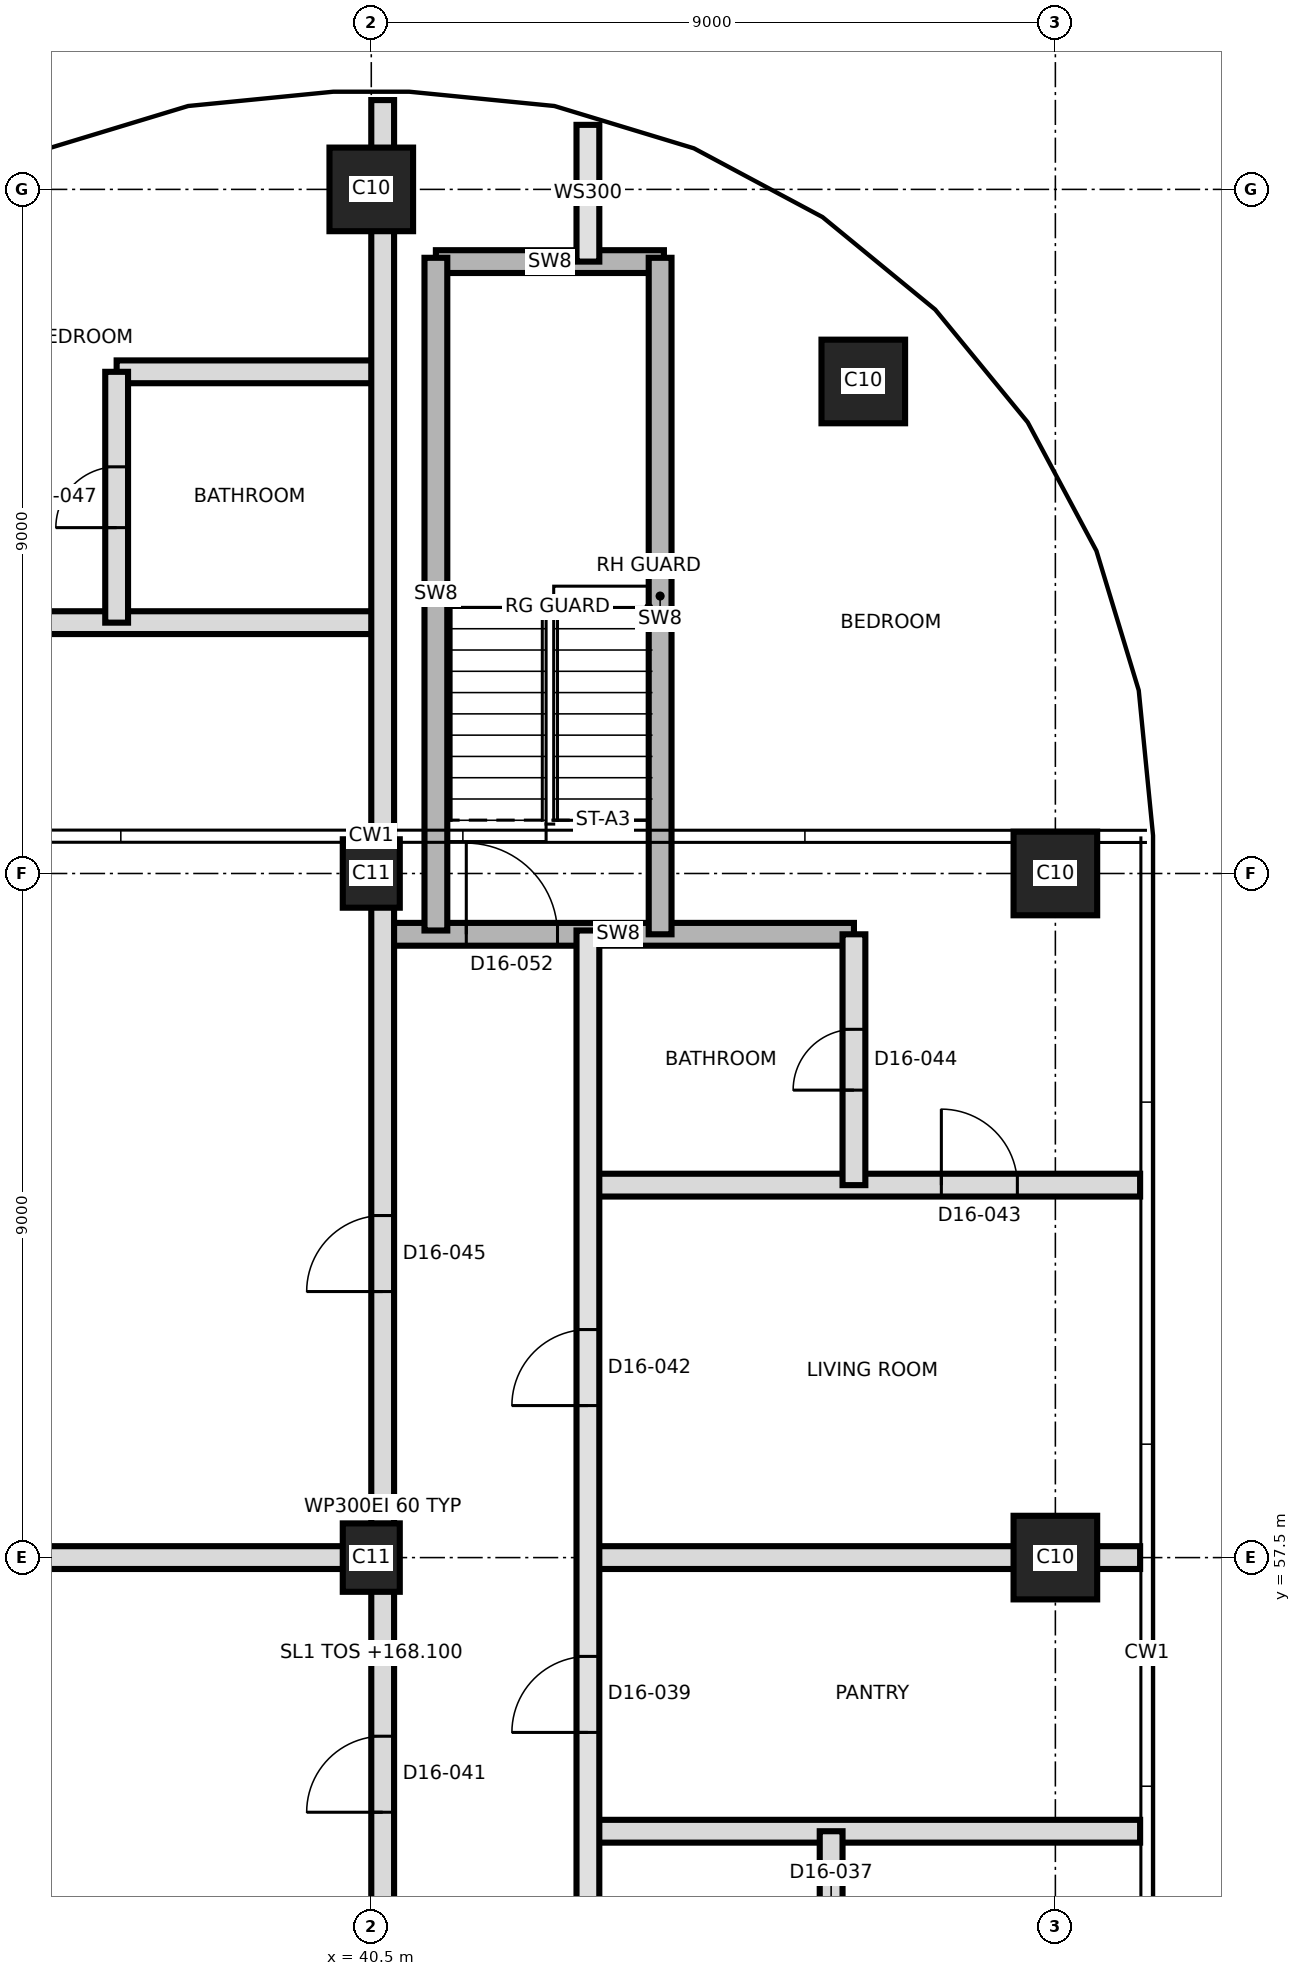
"""IFC4 building model, lengths in metres.
Left out: names, types, materials, properties, quantities, classifications, styles, units other than length and angle.
Written with IfcOpenShell. Run it as: python <this file> out.ifc"""

import sys

from ifc_helpers import new_model, si_unit, direction, frame, frame_2d, origin, origin_2d, place, context, subcontext, project, spatial, rectangle, extrude, element, fill, save


model = new_model("IFC4")
c1 = context("Model", 3, precision=1e-05, world=origin(), true_north=direction((0.0, 1.0)))
c2 = subcontext(c1, "Body", "Model", "MODEL_VIEW")
j1 = project(units=[si_unit("LENGTHUNIT", "METRE"), si_unit("PLANEANGLEUNIT", "RADIAN")], contexts=[c1])
p1 = place(None, origin())
s1 = spatial("IfcSite", under=j1, at=p1, CompositionType="ELEMENT")
p2 = place(p1, origin())
s2 = spatial("IfcBuilding", under=s1, at=p2, CompositionType="ELEMENT")
p3 = place(p2, frame((0.0, 0.0, 168.1)))
s3 = spatial("IfcBuildingStorey", under=s2, at=p3, CompositionType="ELEMENT", Elevation=168.1)
p4 = place(p3, frame((40.5, 57.5, 0.0), z_axis=(0.0, 0.0, 1.0), x_axis=(0.0, 1.0, 0.0)))
e1 = element("IfcColumn", 1, at=p4, inside=s3, PredefinedType="COLUMN", context=c2, shape_type="SweptSolid", body=[
    extrude(rectangle(XDim=0.9, YDim=0.75, at=origin_2d()), origin(), (0.0, 0.0, 1.0), 3.7),
])
p5 = place(p3, frame((49.5, 57.5, 0.0), z_axis=(0.0, 0.0, 1.0), x_axis=(1.0, 0.0, 0.0)))
e2 = element("IfcColumn", 2, at=p5, inside=s3, PredefinedType="COLUMN", context=c2, shape_type="SweptSolid", body=[
    extrude(rectangle(XDim=1.1, YDim=1.1, at=origin_2d()), origin(), (0.0, 0.0, 1.0), 3.7),
])
p6 = place(p3, frame((40.5, 66.5, 0.0), z_axis=(0.0, 0.0, 1.0), x_axis=(0.0, 1.0, 0.0)))
e3 = element("IfcColumn", 3, at=p6, inside=s3, PredefinedType="COLUMN", context=c2, shape_type="SweptSolid", body=[
    extrude(rectangle(XDim=0.9, YDim=0.75, at=origin_2d()), origin(), (0.0, 0.0, 1.0), 3.7),
])
for number, where, z_axis, x_axis in (
    (4, (49.5, 66.5, 0.0), (0.0, 0.0, 1.0), (1.0, 0.0, 0.0)),
    (5, (46.973, 72.973, 0.0), (0.0, 0.0, 1.0), (1.0, 0.0, 0.0)),
    (6, (40.5, 75.5, 0.0), (0.0, 0.0, 1.0), (1.0, 0.0, 0.0)),
):
    element("IfcColumn", number, at=place(p3, frame(where, z_axis=z_axis, x_axis=x_axis)), inside=s3, PredefinedType="COLUMN", context=c2, shape_type="SweptSolid", body=[
        extrude(rectangle(XDim=1.1, YDim=1.1, at=origin_2d()), origin(), (0.0, 0.0, 1.0), 3.7),
    ])
p7 = place(p3, frame((43.35, 53.9, 0.0), z_axis=(0.0, 0.0, 1.0), x_axis=(1.0, 0.0, 0.0)))
e7 = element("IfcWall", 7, at=p7, inside=s3, PredefinedType="PARTITIONING", context=c2, shape_type="SweptSolid", body=[
    extrude(rectangle(XDim=7.265, YDim=0.3, at=frame_2d((3.632, 0.0))), origin(), (0.0, 0.0, 1.0), 3.4),
])
p8 = place(p3, frame((30.565, 57.5, 0.0), z_axis=(0.0, 0.0, 1.0), x_axis=(1.0, 0.0, 0.0)))
e8 = element("IfcWall", 8, at=p8, inside=s3, PredefinedType="PARTITIONING", context=c2, shape_type="SweptSolid", body=[
    extrude(rectangle(XDim=10.085, YDim=0.3, at=frame_2d((5.042, 0.0))), origin(), (0.0, 0.0, 1.0), 3.4),
])
p9 = place(p3, frame((43.35, 57.5, 0.0), z_axis=(0.0, 0.0, 1.0), x_axis=(1.0, 0.0, 0.0)))
e9 = element("IfcWall", 9, at=p9, inside=s3, PredefinedType="PARTITIONING", context=c2, shape_type="SweptSolid", body=[
    extrude(rectangle(XDim=7.265, YDim=0.3, at=frame_2d((3.632, 0.0))), origin(), (0.0, 0.0, 1.0), 3.4),
])
p10 = place(p3, frame((43.35, 62.4, 0.0), z_axis=(0.0, 0.0, 1.0), x_axis=(1.0, 0.0, 0.0)))
e10 = element("IfcWall", 10, at=p10, inside=s3, PredefinedType="PARTITIONING", context=c2, shape_type="SweptSolid", body=[
    extrude(rectangle(XDim=7.265, YDim=0.3, at=frame_2d((3.632, 0.0))), origin(), (0.0, 0.0, 1.0), 3.4),
])
p11 = place(p10, frame((4.65, 0.0, 0.0)))
e11 = element("IfcOpeningElement", 11, at=p11, cuts=e10, PredefinedType="OPENING", context=c2, shape_type="SweptSolid", body=[
    extrude(rectangle(XDim=1.0, YDim=2.1, at=frame_2d((0.5, 1.05))), frame((0.0, 0.16, 0.0), z_axis=(0.0, -1.0, 0.0), x_axis=(1.0, 0.0, 0.0)), (0.0, 0.0, 1.0), 0.32),
])
p12 = place(p3, frame((40.65, 65.7, 0.0), z_axis=(0.0, 0.0, 1.0), x_axis=(1.0, 0.0, 0.0)))
e12 = element("IfcWall", 12, at=p12, inside=s3, PredefinedType="SHEAR", context=c2, shape_type="SweptSolid", body=[
    extrude(rectangle(XDim=6.2, YDim=0.3, at=frame_2d((3.1, 0.0))), origin(), (0.0, 0.0, 1.0), 3.4),
])
p13 = place(p12, frame((1.1, 0.0, 0.0)))
e13 = element("IfcOpeningElement", 13, at=p13, cuts=e12, PredefinedType="OPENING", context=c2, shape_type="SweptSolid", body=[
    extrude(rectangle(XDim=1.2, YDim=2.1, at=frame_2d((0.6, 1.05))), frame((0.0, 0.16, 0.0), z_axis=(0.0, -1.0, 0.0), x_axis=(1.0, 0.0, 0.0)), (0.0, 0.0, 1.0), 0.32),
])
p14 = place(p3, frame((30.788, 69.8, 0.0), z_axis=(0.0, 0.0, 1.0), x_axis=(1.0, 0.0, 0.0)))
e14 = element("IfcWall", 14, at=p14, inside=s3, PredefinedType="PARTITIONING", context=c2, shape_type="SweptSolid", body=[
    extrude(rectangle(XDim=9.862, YDim=0.3, at=frame_2d((4.931, 0.0))), origin(), (0.0, 0.0, 1.0), 3.4),
])
p15 = place(p14, frame((4.212, 0.0, 0.0)))
e15 = element("IfcOpeningElement", 15, at=p15, cuts=e14, PredefinedType="OPENING", context=c2, shape_type="SweptSolid", body=[
    extrude(rectangle(XDim=1.0, YDim=2.1, at=frame_2d((0.5, 1.05))), frame((0.0, 0.16, 0.0), z_axis=(0.0, -1.0, 0.0), x_axis=(1.0, 0.0, 0.0)), (0.0, 0.0, 1.0), 0.32),
])
p16 = place(p3, frame((37.15, 73.1, 0.0), z_axis=(0.0, 0.0, 1.0), x_axis=(1.0, 0.0, 0.0)))
e16 = element("IfcWall", 16, at=p16, inside=s3, PredefinedType="PARTITIONING", context=c2, shape_type="SweptSolid", body=[
    extrude(rectangle(XDim=3.5, YDim=0.3, at=frame_2d((1.75, 0.0))), origin(), (0.0, 0.0, 1.0), 3.4),
])
p17 = place(p3, frame((41.35, 74.55, 0.0), z_axis=(0.0, 0.0, 1.0), x_axis=(1.0, 0.0, 0.0)))
e17 = element("IfcWall", 17, at=p17, inside=s3, PredefinedType="SHEAR", context=c2, shape_type="SweptSolid", body=[
    extrude(rectangle(XDim=3.0, YDim=0.3, at=frame_2d((1.5, 0.0))), origin(), (0.0, 0.0, 1.0), 3.4),
])
p18 = place(p3, frame((37.15, 69.8, 0.0), z_axis=(0.0, 0.0, 1.0), x_axis=(0.0, 1.0, 0.0)))
e18 = element("IfcWall", 18, at=p18, inside=s3, PredefinedType="PARTITIONING", context=c2, shape_type="SweptSolid", body=[
    extrude(rectangle(XDim=3.3, YDim=0.3, at=frame_2d((1.65, 0.0))), origin(), (0.0, 0.0, 1.0), 3.4),
])
p19 = place(p18, frame((1.25, 0.0, 0.0)))
e19 = element("IfcOpeningElement", 19, at=p19, cuts=e18, PredefinedType="OPENING", context=c2, shape_type="SweptSolid", body=[
    extrude(rectangle(XDim=0.8, YDim=2.1, at=frame_2d((0.4, 1.05))), frame((0.0, 0.16, 0.0), z_axis=(0.0, -1.0, 0.0), x_axis=(1.0, 0.0, 0.0)), (0.0, 0.0, 1.0), 0.32),
])
p20 = place(p3, frame((40.65, 39.65, 0.0), z_axis=(0.0, 0.0, 1.0), x_axis=(0.0, 1.0, 0.0)))
e20 = element("IfcWall", 20, at=p20, inside=s3, PredefinedType="PARTITIONING", context=c2, shape_type="SweptSolid", body=[
    extrude(rectangle(XDim=37.025, YDim=0.3, at=frame_2d((18.513, 0.0))), origin(), (0.0, 0.0, 1.0), 3.4),
])
p21 = place(p20, frame((1.0, 0.0, 0.0)))
e21 = element("IfcOpeningElement", 21, at=p21, cuts=e20, PredefinedType="OPENING", context=c2, shape_type="SweptSolid", body=[
    extrude(rectangle(XDim=1.0, YDim=2.1, at=frame_2d((0.5, 1.05))), frame((0.0, 0.16, 0.0), z_axis=(0.0, -1.0, 0.0), x_axis=(1.0, 0.0, 0.0)), (0.0, 0.0, 1.0), 0.32),
])
p22 = place(p20, frame((6.85, 0.0, 0.0)))
e22 = element("IfcOpeningElement", 22, at=p22, cuts=e20, PredefinedType="OPENING", context=c2, shape_type="SweptSolid", body=[
    extrude(rectangle(XDim=1.0, YDim=2.1, at=frame_2d((0.5, 1.05))), frame((0.0, 0.16, 0.0), z_axis=(0.0, -1.0, 0.0), x_axis=(1.0, 0.0, 0.0)), (0.0, 0.0, 1.0), 0.32),
])
p23 = place(p20, frame((14.5, 0.0, 0.0)))
e23 = element("IfcOpeningElement", 23, at=p23, cuts=e20, PredefinedType="OPENING", context=c2, shape_type="SweptSolid", body=[
    extrude(rectangle(XDim=1.0, YDim=2.4, at=frame_2d((0.5, 1.2))), frame((0.0, 0.16, 0.0), z_axis=(0.0, -1.0, 0.0), x_axis=(1.0, 0.0, 0.0)), (0.0, 0.0, 1.0), 0.32),
])
p24 = place(p20, frame((21.35, 0.0, 0.0)))
e24 = element("IfcOpeningElement", 24, at=p24, cuts=e20, PredefinedType="OPENING", context=c2, shape_type="SweptSolid", body=[
    extrude(rectangle(XDim=1.0, YDim=2.4, at=frame_2d((0.5, 1.2))), frame((0.0, 0.16, 0.0), z_axis=(0.0, -1.0, 0.0), x_axis=(1.0, 0.0, 0.0)), (0.0, 0.0, 1.0), 0.32),
])
p25 = place(p3, frame((41.35, 65.75, 0.0), z_axis=(0.0, 0.0, 1.0), x_axis=(0.0, 1.0, 0.0)))
e25 = element("IfcWall", 25, at=p25, inside=s3, PredefinedType="SHEAR", context=c2, shape_type="SweptSolid", body=[
    extrude(rectangle(XDim=8.85, YDim=0.3, at=frame_2d((4.425, 0.0))), origin(), (0.0, 0.0, 1.0), 3.4),
])
p26 = place(p3, frame((43.35, 39.65, 0.0), z_axis=(0.0, 0.0, 1.0), x_axis=(0.0, 1.0, 0.0)))
e26 = element("IfcWall", 26, at=p26, inside=s3, PredefinedType="SOLIDWALL", context=c2, shape_type="SweptSolid", body=[
    extrude(rectangle(XDim=26.1, YDim=0.3, at=frame_2d((13.05, 0.0))), origin(), (0.0, 0.0, 1.0), 3.4),
])
p27 = place(p26, frame((0.985, 0.0, 0.0)))
e27 = element("IfcOpeningElement", 27, at=p27, cuts=e26, PredefinedType="OPENING", context=c2, shape_type="SweptSolid", body=[
    extrude(rectangle(XDim=1.2, YDim=2.1, at=frame_2d((0.6, 1.05))), frame((0.0, 0.16, 0.0), z_axis=(0.0, -1.0, 0.0), x_axis=(1.0, 0.0, 0.0)), (0.0, 0.0, 1.0), 0.32),
])
p28 = place(p26, frame((4.235, 0.0, 0.0)))
e28 = element("IfcOpeningElement", 28, at=p28, cuts=e26, PredefinedType="OPENING", context=c2, shape_type="SweptSolid", body=[
    extrude(rectangle(XDim=1.0, YDim=2.1, at=frame_2d((0.5, 1.05))), frame((0.0, 0.16, 0.0), z_axis=(0.0, -1.0, 0.0), x_axis=(1.0, 0.0, 0.0)), (0.0, 0.0, 1.0), 0.32),
])
p29 = place(p26, frame((9.7, 0.0, 0.0)))
e29 = element("IfcOpeningElement", 29, at=p29, cuts=e26, PredefinedType="OPENING", context=c2, shape_type="SweptSolid", body=[
    extrude(rectangle(XDim=1.0, YDim=2.1, at=frame_2d((0.5, 1.05))), frame((0.0, 0.16, 0.0), z_axis=(0.0, -1.0, 0.0), x_axis=(1.0, 0.0, 0.0)), (0.0, 0.0, 1.0), 0.32),
])
p30 = place(p26, frame((15.55, 0.0, 0.0)))
e30 = element("IfcOpeningElement", 30, at=p30, cuts=e26, PredefinedType="OPENING", context=c2, shape_type="SweptSolid", body=[
    extrude(rectangle(XDim=1.0, YDim=2.1, at=frame_2d((0.5, 1.05))), frame((0.0, 0.16, 0.0), z_axis=(0.0, -1.0, 0.0), x_axis=(1.0, 0.0, 0.0)), (0.0, 0.0, 1.0), 0.32),
])
p31 = place(p26, frame((19.85, 0.0, 0.0)))
e31 = element("IfcOpeningElement", 31, at=p31, cuts=e26, PredefinedType="OPENING", context=c2, shape_type="SweptSolid", body=[
    extrude(rectangle(XDim=1.0, YDim=2.4, at=frame_2d((0.5, 1.2))), frame((0.0, 0.16, 0.0), z_axis=(0.0, -1.0, 0.0), x_axis=(1.0, 0.0, 0.0)), (0.0, 0.0, 1.0), 0.32),
])
p32 = place(p3, frame((43.35, 74.55, 0.0), z_axis=(0.0, 0.0, 1.0), x_axis=(0.0, 1.0, 0.0)))
e32 = element("IfcWall", 32, at=p32, inside=s3, PredefinedType="SOLIDWALL", context=c2, shape_type="SweptSolid", body=[
    extrude(rectangle(XDim=1.799, YDim=0.3, at=frame_2d((0.899, 0.0))), origin(), (0.0, 0.0, 1.0), 3.4),
])
p33 = place(p3, frame((44.3, 65.7, 0.0), z_axis=(0.0, 0.0, 1.0), x_axis=(0.0, 1.0, 0.0)))
e33 = element("IfcWall", 33, at=p33, inside=s3, PredefinedType="SHEAR", context=c2, shape_type="SweptSolid", body=[
    extrude(rectangle(XDim=8.9, YDim=0.3, at=frame_2d((4.45, 0.0))), origin(), (0.0, 0.0, 1.0), 3.4),
])
p34 = place(p3, frame((46.55, 51.2, 0.0), z_axis=(0.0, 0.0, 1.0), x_axis=(0.0, 1.0, 0.0)))
e34 = element("IfcWall", 34, at=p34, inside=s3, PredefinedType="PARTITIONING", context=c2, shape_type="SweptSolid", body=[
    extrude(rectangle(XDim=2.7, YDim=0.3, at=frame_2d((1.35, 0.0))), origin(), (0.0, 0.0, 1.0), 3.4),
])
p35 = place(p34, frame((0.95, 0.0, 0.0)))
e35 = element("IfcOpeningElement", 35, at=p35, cuts=e34, PredefinedType="OPENING", context=c2, shape_type="SweptSolid", body=[
    extrude(rectangle(XDim=0.8, YDim=2.1, at=frame_2d((0.4, 1.05))), frame((0.0, 0.16, 0.0), z_axis=(0.0, -1.0, 0.0), x_axis=(1.0, 0.0, 0.0)), (0.0, 0.0, 1.0), 0.32),
])
p36 = place(p3, frame((46.85, 62.4, 0.0), z_axis=(0.0, 0.0, 1.0), x_axis=(0.0, 1.0, 0.0)))
e36 = element("IfcWall", 36, at=p36, inside=s3, PredefinedType="PARTITIONING", context=c2, shape_type="SweptSolid", body=[
    extrude(rectangle(XDim=3.3, YDim=0.3, at=frame_2d((1.65, 0.0))), origin(), (0.0, 0.0, 1.0), 3.4),
])
p37 = place(p36, frame((1.25, 0.0, 0.0)))
e37 = element("IfcOpeningElement", 37, at=p37, cuts=e36, PredefinedType="OPENING", context=c2, shape_type="SweptSolid", body=[
    extrude(rectangle(XDim=0.8, YDim=2.1, at=frame_2d((0.4, 1.05))), frame((0.0, 0.16, 0.0), z_axis=(0.0, -1.0, 0.0), x_axis=(1.0, 0.0, 0.0)), (0.0, 0.0, 1.0), 0.32),
])
p38 = place(p30, origin())
e38 = element("IfcDoor", 38, at=p38, inside=s3, OperationType="SINGLE_SWING_LEFT", PredefinedType="DOOR", context=c2, shape_type="SweptSolid", body=[
    extrude(rectangle(XDim=1.0, YDim=2.1, at=frame_2d((0.5, 1.05))), frame((0.0, 0.025, 0.0), z_axis=(0.0, -1.0, 0.0), x_axis=(1.0, 0.0, 0.0)), (0.0, 0.0, 1.0), 0.05),
])
fill(e30, e38)
p39 = place(p23, origin())
e39 = element("IfcDoor", 39, at=p39, inside=s3, OperationType="SINGLE_SWING_RIGHT", PredefinedType="DOOR", context=c2, shape_type="SweptSolid", body=[
    extrude(rectangle(XDim=1.0, YDim=2.4, at=frame_2d((0.5, 1.2))), frame((0.0, 0.025, 0.0), z_axis=(0.0, -1.0, 0.0), x_axis=(1.0, 0.0, 0.0)), (0.0, 0.0, 1.0), 0.05),
])
fill(e23, e39)
p40 = place(p31, origin())
e40 = element("IfcDoor", 40, at=p40, inside=s3, OperationType="SINGLE_SWING_LEFT", PredefinedType="DOOR", context=c2, shape_type="SweptSolid", body=[
    extrude(rectangle(XDim=1.0, YDim=2.4, at=frame_2d((0.5, 1.2))), frame((0.0, 0.025, 0.0), z_axis=(0.0, -1.0, 0.0), x_axis=(1.0, 0.0, 0.0)), (0.0, 0.0, 1.0), 0.05),
])
fill(e31, e40)
p41 = place(p11, origin())
e41 = element("IfcDoor", 41, at=p41, inside=s3, OperationType="SINGLE_SWING_RIGHT", PredefinedType="DOOR", context=c2, shape_type="SweptSolid", body=[
    extrude(rectangle(XDim=1.0, YDim=2.1, at=frame_2d((0.5, 1.05))), frame((0.0, 0.025, 0.0), z_axis=(0.0, -1.0, 0.0), x_axis=(1.0, 0.0, 0.0)), (0.0, 0.0, 1.0), 0.05),
])
fill(e11, e41)
p42 = place(p37, origin())
e42 = element("IfcDoor", 42, at=p42, inside=s3, OperationType="SINGLE_SWING_LEFT", PredefinedType="DOOR", context=c2, shape_type="SweptSolid", body=[
    extrude(rectangle(XDim=0.8, YDim=2.1, at=frame_2d((0.4, 1.05))), frame((0.0, 0.025, 0.0), z_axis=(0.0, -1.0, 0.0), x_axis=(1.0, 0.0, 0.0)), (0.0, 0.0, 1.0), 0.05),
])
fill(e37, e42)
p43 = place(p24, origin())
e43 = element("IfcDoor", 43, at=p43, inside=s3, OperationType="SINGLE_SWING_LEFT", PredefinedType="DOOR", context=c2, shape_type="SweptSolid", body=[
    extrude(rectangle(XDim=1.0, YDim=2.4, at=frame_2d((0.5, 1.2))), frame((0.0, 0.025, 0.0), z_axis=(0.0, -1.0, 0.0), x_axis=(1.0, 0.0, 0.0)), (0.0, 0.0, 1.0), 0.05),
])
fill(e24, e43)
p44 = place(p19, origin())
e44 = element("IfcDoor", 44, at=p44, inside=s3, OperationType="SINGLE_SWING_LEFT", PredefinedType="DOOR", context=c2, shape_type="SweptSolid", body=[
    extrude(rectangle(XDim=0.8, YDim=2.1, at=frame_2d((0.4, 1.05))), frame((0.0, 0.025, 0.0), z_axis=(0.0, -1.0, 0.0), x_axis=(1.0, 0.0, 0.0)), (0.0, 0.0, 1.0), 0.05),
])
fill(e19, e44)
p45 = place(p13, origin())
e45 = element("IfcDoor", 45, at=p45, inside=s3, OperationType="SINGLE_SWING_RIGHT", PredefinedType="DOOR", context=c2, shape_type="SweptSolid", body=[
    extrude(rectangle(XDim=1.2, YDim=2.1, at=frame_2d((0.6, 1.05))), frame((0.0, 0.025, 0.0), z_axis=(0.0, -1.0, 0.0), x_axis=(1.0, 0.0, 0.0)), (0.0, 0.0, 1.0), 0.05),
])
fill(e13, e45)
save(model, sys.argv[1])
